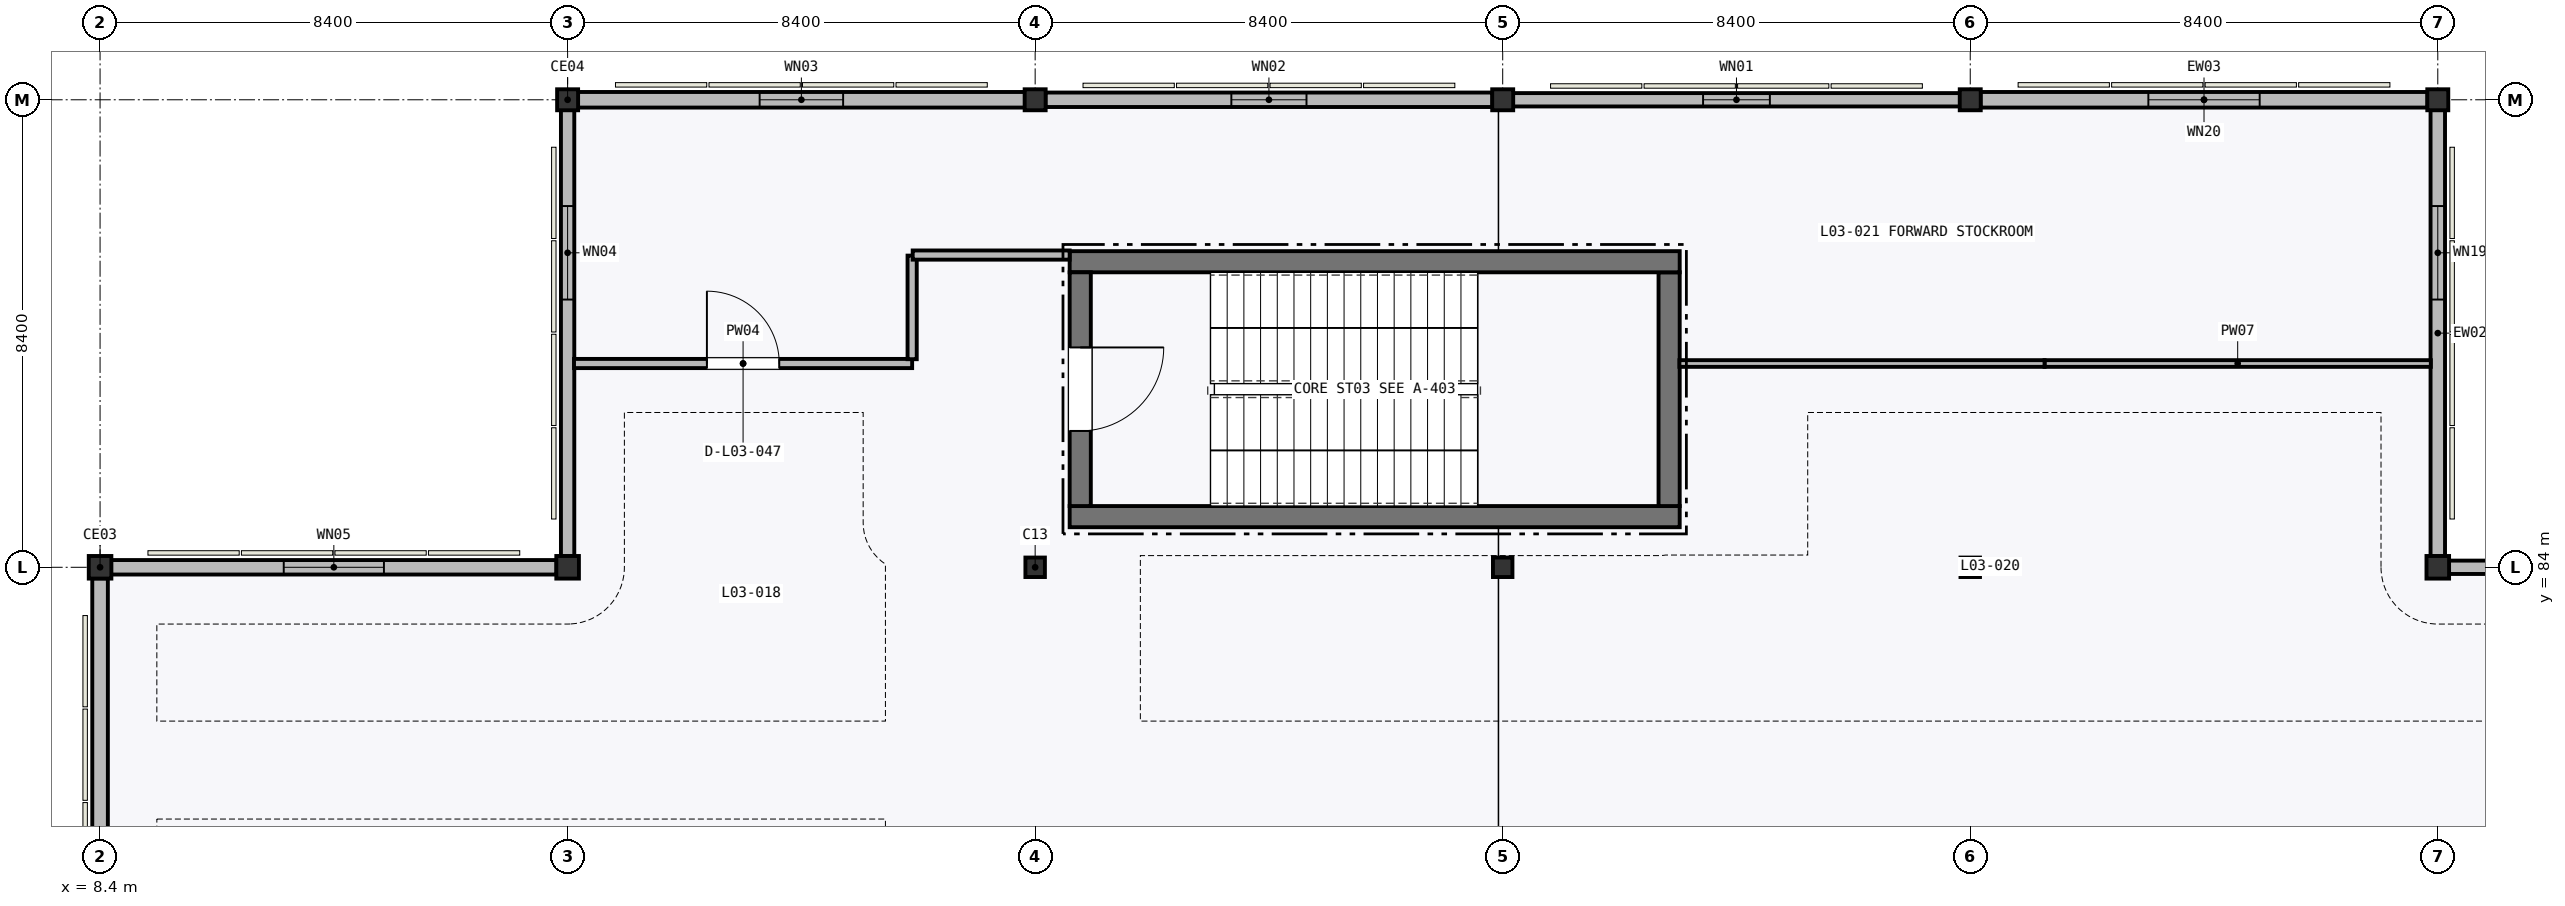
"""IFC4 building model, lengths in metres.
Left out: names, types, materials, properties, quantities, classifications, styles, units other than length and angle.
Written with IfcOpenShell. Run it as: python <this file> out.ifc"""

import sys

from ifc_helpers import new_model, si_unit, direction, frame, frame_2d, origin, origin_2d, place, context, subcontext, project, spatial, rectangle, hollow_circle, i_section, extrude, element, fill, save


model = new_model("IFC4")
c1 = context("Model", 3, precision=1e-05, world=origin(), true_north=direction((0.0, 1.0)))
c2 = subcontext(c1, "Body", "Model", "MODEL_VIEW")
j1 = project(units=[si_unit("LENGTHUNIT", "METRE"), si_unit("PLANEANGLEUNIT", "RADIAN")], contexts=[c1])
p1 = place(None, origin())
s1 = spatial("IfcSite", under=j1, at=p1, CompositionType="ELEMENT")
p2 = place(p1, origin())
s2 = spatial("IfcBuilding", under=s1, at=p2, CompositionType="ELEMENT")
p3 = place(p2, frame((0.0, 0.0, 11.4)))
s3 = spatial("IfcBuildingStorey", under=s2, at=p3, CompositionType="ELEMENT", Elevation=11.4)
for number, where, z_axis, x_axis in (
    (1, (8.4, 84.0, 0.0), (0.0, 0.0, 1.0), (1.0, 0.0, 0.0)),
    (2, (16.8, 84.0, 0.0), (0.0, 0.0, 1.0), (1.0, 0.0, 0.0)),
):
    element("IfcColumn", number, at=place(p3, frame(where, z_axis=z_axis, x_axis=x_axis)), inside=s3, PredefinedType="COLUMN", context=c2, shape_type="SweptSolid", body=[
        extrude(hollow_circle(Radius=0.203, WallThickness=0.016, at=origin_2d()), origin(), (0.0, 0.0, 1.0), 5.1),
    ])
p4 = place(p3, frame((16.8, 92.4, 0.0), z_axis=(0.0, 0.0, 1.0), x_axis=(1.0, 0.0, 0.0)))
e3 = element("IfcColumn", 3, at=p4, inside=s3, PredefinedType="COLUMN", context=c2, shape_type="SweptSolid", body=[
    extrude(hollow_circle(Radius=0.188, WallThickness=0.014, at=origin_2d()), origin(), (0.0, 0.0, 1.0), 5.1),
])
p5 = place(p3, frame((25.2, 84.0, 0.0), z_axis=(0.0, 0.0, 1.0), x_axis=(1.0, 0.0, 0.0)))
e4 = element("IfcColumn", 4, at=p5, inside=s3, PredefinedType="COLUMN", context=c2, shape_type="SweptSolid", body=[
    extrude(i_section(OverallWidth=0.35, OverallDepth=0.35, WebThickness=0.012, FlangeThickness=0.019, FilletRadius=0.02, at=origin_2d()), origin(), (0.0, 0.0, 1.0), 5.1),
])
p6 = place(p3, frame((25.2, 92.4, 0.0), z_axis=(0.0, 0.0, 1.0), x_axis=(1.0, 0.0, 0.0)))
e5 = element("IfcColumn", 5, at=p6, inside=s3, PredefinedType="COLUMN", context=c2, shape_type="SweptSolid", body=[
    extrude(hollow_circle(Radius=0.188, WallThickness=0.014, at=origin_2d()), origin(), (0.0, 0.0, 1.0), 5.1),
])
p7 = place(p3, frame((33.6, 84.0, 0.0), z_axis=(0.0, 0.0, 1.0), x_axis=(1.0, 0.0, 0.0)))
e6 = element("IfcColumn", 6, at=p7, inside=s3, PredefinedType="COLUMN", context=c2, shape_type="SweptSolid", body=[
    extrude(i_section(OverallWidth=0.35, OverallDepth=0.35, WebThickness=0.012, FlangeThickness=0.019, FilletRadius=0.02, at=origin_2d()), origin(), (0.0, 0.0, 1.0), 5.1),
])
p8 = place(p3, frame((33.6, 92.4, 0.0), z_axis=(0.0, 0.0, 1.0), x_axis=(1.0, 0.0, 0.0)))
e7 = element("IfcColumn", 7, at=p8, inside=s3, PredefinedType="COLUMN", context=c2, shape_type="SweptSolid", body=[
    extrude(hollow_circle(Radius=0.188, WallThickness=0.014, at=origin_2d()), origin(), (0.0, 0.0, 1.0), 5.1),
])
p9 = place(p3, frame((42.0, 84.0, 0.0), z_axis=(0.0, 0.0, 1.0), x_axis=(1.0, 0.0, 0.0)))
e8 = element("IfcColumn", 8, at=p9, inside=s3, PredefinedType="COLUMN", context=c2, shape_type="SweptSolid", body=[
    extrude(i_section(OverallWidth=0.35, OverallDepth=0.35, WebThickness=0.012, FlangeThickness=0.019, FilletRadius=0.02, at=origin_2d()), origin(), (0.0, 0.0, 1.0), 5.1),
])
p10 = place(p3, frame((42.0, 92.4, 0.0), z_axis=(0.0, 0.0, 1.0), x_axis=(1.0, 0.0, 0.0)))
e9 = element("IfcColumn", 9, at=p10, inside=s3, PredefinedType="COLUMN", context=c2, shape_type="SweptSolid", body=[
    extrude(hollow_circle(Radius=0.188, WallThickness=0.014, at=origin_2d()), origin(), (0.0, 0.0, 1.0), 5.1),
])
p11 = place(p3, frame((50.4, 84.0, 0.0), z_axis=(0.0, 0.0, 1.0), x_axis=(1.0, 0.0, 0.0)))
e10 = element("IfcColumn", 10, at=p11, inside=s3, PredefinedType="COLUMN", context=c2, shape_type="SweptSolid", body=[
    extrude(hollow_circle(Radius=0.203, WallThickness=0.016, at=origin_2d()), origin(), (0.0, 0.0, 1.0), 5.1),
])
p12 = place(p3, frame((50.4, 92.4, 0.0), z_axis=(0.0, 0.0, 1.0), x_axis=(1.0, 0.0, 0.0)))
e11 = element("IfcColumn", 11, at=p12, inside=s3, PredefinedType="COLUMN", context=c2, shape_type="SweptSolid", body=[
    extrude(hollow_circle(Radius=0.188, WallThickness=0.014, at=origin_2d()), origin(), (0.0, 0.0, 1.0), 5.1),
])
p13 = place(p3, frame((58.65, 84.0, 0.0), z_axis=(0.0, 0.0, 1.0), x_axis=(-1.0, 0.0, 0.0)))
e12 = element("IfcWall", 12, at=p13, inside=s3, PredefinedType="STANDARD", context=c2, shape_type="SweptSolid", body=[
    extrude(rectangle(XDim=8.052, YDim=0.24, at=frame_2d((4.026, 0.0))), origin(), (0.0, 0.0, 1.0), 4.331),
])
p14 = place(p13, frame((2.826, 0.0, 0.95)))
e13 = element("IfcOpeningElement", 13, at=p14, cuts=e12, PredefinedType="OPENING", context=c2, shape_type="SweptSolid", body=[
    extrude(rectangle(XDim=2.4, YDim=2.4, at=frame_2d((1.2, 1.2))), frame((0.0, 0.13, 0.0), z_axis=(0.0, -1.0, 0.0), x_axis=(1.0, 0.0, 0.0)), (0.0, 0.0, 1.0), 0.26),
])
p15 = place(p3, frame((50.4, 84.198, 0.0), z_axis=(0.0, 0.0, 1.0), x_axis=(0.0, 1.0, 0.0)))
e14 = element("IfcWall", 14, at=p15, inside=s3, PredefinedType="STANDARD", context=c2, shape_type="SweptSolid", body=[
    extrude(rectangle(XDim=8.019, YDim=0.26, at=frame_2d((4.009, 0.0))), origin(), (0.0, 0.0, 1.0), 4.487),
])
p16 = place(p15, frame((4.613, 0.0, 0.95)))
e15 = element("IfcOpeningElement", 15, at=p16, cuts=e14, PredefinedType="OPENING", context=c2, shape_type="SweptSolid", body=[
    extrude(rectangle(XDim=1.68, YDim=1.5, at=frame_2d((0.84, 0.75))), frame((0.0, 0.14, 0.0), z_axis=(0.0, -1.0, 0.0), x_axis=(1.0, 0.0, 0.0)), (0.0, 0.0, 1.0), 0.28),
])
p17 = place(p3, frame((50.217, 92.4, 0.0), z_axis=(0.0, 0.0, 1.0), x_axis=(-1.0, 0.0, 0.0)))
e16 = element("IfcWall", 16, at=p17, inside=s3, PredefinedType="STANDARD", context=c2, shape_type="SweptSolid", body=[
    extrude(rectangle(XDim=8.033, YDim=0.28, at=frame_2d((4.017, 0.0))), origin(), (0.0, 0.0, 1.0), 4.487),
])
p18 = place(p17, frame((3.017, 0.0, 0.95)))
e17 = element("IfcOpeningElement", 17, at=p18, cuts=e16, PredefinedType="OPENING", context=c2, shape_type="SweptSolid", body=[
    extrude(rectangle(XDim=2.0, YDim=1.6, at=frame_2d((1.0, 0.8))), frame((0.0, 0.15, 0.0), z_axis=(0.0, -1.0, 0.0), x_axis=(1.0, 0.0, 0.0)), (0.0, 0.0, 1.0), 0.3),
])
p19 = place(p3, frame((41.816, 92.4, 0.0), z_axis=(0.0, 0.0, 1.0), x_axis=(-1.0, 0.0, 0.0)))
e18 = element("IfcWall", 18, at=p19, inside=s3, PredefinedType="STANDARD", context=c2, shape_type="SweptSolid", body=[
    extrude(rectangle(XDim=8.033, YDim=0.24, at=frame_2d((4.017, 0.0))), origin(), (0.0, 0.0, 1.0), 4.487),
])
p20 = place(p19, frame((3.417, 0.0, 0.95)))
e19 = element("IfcOpeningElement", 19, at=p20, cuts=e18, PredefinedType="OPENING", context=c2, shape_type="SweptSolid", body=[
    extrude(rectangle(XDim=1.2, YDim=1.8, at=frame_2d((0.6, 0.9))), frame((0.0, 0.13, 0.0), z_axis=(0.0, -1.0, 0.0), x_axis=(1.0, 0.0, 0.0)), (0.0, 0.0, 1.0), 0.26),
])
p21 = place(p3, frame((33.417, 92.4, 0.0), z_axis=(0.0, 0.0, 1.0), x_axis=(-1.0, 0.0, 0.0)))
e20 = element("IfcWall", 20, at=p21, inside=s3, PredefinedType="STANDARD", context=c2, shape_type="SweptSolid", body=[
    extrude(rectangle(XDim=8.033, YDim=0.26, at=frame_2d((4.017, 0.0))), origin(), (0.0, 0.0, 1.0), 4.487),
])
p22 = place(p21, frame((3.342, 0.0, 0.95)))
e21 = element("IfcOpeningElement", 21, at=p22, cuts=e20, PredefinedType="OPENING", context=c2, shape_type="SweptSolid", body=[
    extrude(rectangle(XDim=1.35, YDim=1.8, at=frame_2d((0.675, 0.9))), frame((0.0, 0.14, 0.0), z_axis=(0.0, -1.0, 0.0), x_axis=(1.0, 0.0, 0.0)), (0.0, 0.0, 1.0), 0.28),
])
p23 = place(p3, frame((25.017, 92.4, 0.0), z_axis=(0.0, 0.0, 1.0), x_axis=(-1.0, 0.0, 0.0)))
e22 = element("IfcWall", 22, at=p23, inside=s3, PredefinedType="STANDARD", context=c2, shape_type="SweptSolid", body=[
    extrude(rectangle(XDim=8.033, YDim=0.28, at=frame_2d((4.017, 0.0))), origin(), (0.0, 0.0, 1.0), 4.487),
])
p24 = place(p23, frame((3.267, 0.0, 0.95)))
e23 = element("IfcOpeningElement", 23, at=p24, cuts=e22, PredefinedType="OPENING", context=c2, shape_type="SweptSolid", body=[
    extrude(rectangle(XDim=1.5, YDim=1.8, at=frame_2d((0.75, 0.9))), frame((0.0, 0.15, 0.0), z_axis=(0.0, -1.0, 0.0), x_axis=(1.0, 0.0, 0.0)), (0.0, 0.0, 1.0), 0.3),
])
p25 = place(p3, frame((16.8, 92.217, 0.0), z_axis=(0.0, 0.0, 1.0), x_axis=(0.0, -1.0, 0.0)))
e24 = element("IfcWall", 24, at=p25, inside=s3, PredefinedType="STANDARD", context=c2, shape_type="SweptSolid", body=[
    extrude(rectangle(XDim=8.019, YDim=0.24, at=frame_2d((4.009, 0.0))), origin(), (0.0, 0.0, 1.0), 4.487),
])
p26 = place(p25, frame((1.726, 0.0, 0.95)))
e25 = element("IfcOpeningElement", 25, at=p26, cuts=e24, PredefinedType="OPENING", context=c2, shape_type="SweptSolid", body=[
    extrude(rectangle(XDim=1.68, YDim=1.8, at=frame_2d((0.84, 0.9))), frame((0.0, 0.13, 0.0), z_axis=(0.0, -1.0, 0.0), x_axis=(1.0, 0.0, 0.0)), (0.0, 0.0, 1.0), 0.26),
])
p27 = place(p3, frame((16.602, 84.0, 0.0), z_axis=(0.0, 0.0, 1.0), x_axis=(-1.0, 0.0, 0.0)))
e26 = element("IfcWall", 26, at=p27, inside=s3, PredefinedType="STANDARD", context=c2, shape_type="SweptSolid", body=[
    extrude(rectangle(XDim=8.004, YDim=0.26, at=frame_2d((4.002, 0.0))), origin(), (0.0, 0.0, 1.0), 4.331),
])
p28 = place(p27, frame((3.102, 0.0, 0.95)))
e27 = element("IfcOpeningElement", 27, at=p28, cuts=e26, PredefinedType="OPENING", context=c2, shape_type="SweptSolid", body=[
    extrude(rectangle(XDim=1.8, YDim=1.8, at=frame_2d((0.9, 0.9))), frame((0.0, 0.14, 0.0), z_axis=(0.0, -1.0, 0.0), x_axis=(1.0, 0.0, 0.0)), (0.0, 0.0, 1.0), 0.28),
])
p29 = place(p3, frame((8.4, 83.802, 0.0), z_axis=(0.0, 0.0, 1.0), x_axis=(0.0, -1.0, 0.0)))
e28 = element("IfcWall", 28, at=p29, inside=s3, PredefinedType="STANDARD", context=c2, shape_type="SweptSolid", body=[
    extrude(rectangle(XDim=8.019, YDim=0.28, at=frame_2d((4.009, 0.0))), origin(), (0.0, 0.0, 1.0), 4.487),
])
p30 = place(p29, frame((4.853, 0.0, 0.95)))
e29 = element("IfcOpeningElement", 29, at=p30, cuts=e28, PredefinedType="OPENING", context=c2, shape_type="SweptSolid", body=[
    extrude(rectangle(XDim=1.2, YDim=2.1, at=frame_2d((0.6, 1.05))), frame((0.0, 0.15, 0.0), z_axis=(0.0, -1.0, 0.0), x_axis=(1.0, 0.0, 0.0)), (0.0, 0.0, 1.0), 0.3),
])
p31 = place(p3, frame((25.82, 84.91, 0.0), z_axis=(0.0, 0.0, 1.0), x_axis=(1.0, 0.0, 0.0)))
e30 = element("IfcWall", 30, at=p31, inside=s3, PredefinedType="SHEAR", context=c2, shape_type="SweptSolid", body=[
    extrude(rectangle(XDim=10.96, YDim=0.38, at=frame_2d((5.48, 0.0))), origin(), (0.0, 0.0, 1.0), 4.845),
])
p32 = place(p3, frame((36.59, 85.1, 0.0), z_axis=(0.0, 0.0, 1.0), x_axis=(0.0, 1.0, 0.0)))
e31 = element("IfcWall", 31, at=p32, inside=s3, PredefinedType="SHEAR", context=c2, shape_type="SweptSolid", body=[
    extrude(rectangle(XDim=4.2, YDim=0.38, at=frame_2d((2.1, 0.0))), origin(), (0.0, 0.0, 1.0), 4.845),
])
p33 = place(p3, frame((36.78, 89.49, 0.0), z_axis=(0.0, 0.0, 1.0), x_axis=(-1.0, 0.0, 0.0)))
e32 = element("IfcWall", 32, at=p33, inside=s3, PredefinedType="SHEAR", context=c2, shape_type="SweptSolid", body=[
    extrude(rectangle(XDim=10.96, YDim=0.38, at=frame_2d((5.48, 0.0))), origin(), (0.0, 0.0, 1.0), 4.845),
])
p34 = place(p3, frame((26.01, 89.3, 0.0), z_axis=(0.0, 0.0, 1.0), x_axis=(0.0, -1.0, 0.0)))
e33 = element("IfcWall", 33, at=p34, inside=s3, PredefinedType="SHEAR", context=c2, shape_type="SweptSolid", body=[
    extrude(rectangle(XDim=4.2, YDim=0.38, at=frame_2d((2.1, 0.0))), origin(), (0.0, 0.0, 1.0), 4.845),
])
p35 = place(p34, frame((1.35, 0.0, 0.0)))
e34 = element("IfcOpeningElement", 34, at=p35, cuts=e33, PredefinedType="OPENING", context=c2, shape_type="SweptSolid", body=[
    extrude(rectangle(XDim=1.5, YDim=2.15, at=frame_2d((0.75, 1.075))), frame((0.0, 0.2, 0.0), z_axis=(0.0, -1.0, 0.0), x_axis=(1.0, 0.0, 0.0)), (0.0, 0.0, 1.0), 0.4),
])
p36 = place(p3, frame((50.275, 87.661, 0.0), z_axis=(0.0, 0.0, 1.0), x_axis=(-1.0, 0.0, 0.0)))
e35 = element("IfcWall", 35, at=p36, inside=s3, PredefinedType="PARTITIONING", context=c2, shape_type="SweptSolid", body=[
    extrude(rectangle(XDim=6.94, YDim=0.12, at=frame_2d((3.47, 0.0))), origin(), (0.0, 0.0, 1.0), 4.845),
])
p37 = place(p3, frame((43.335, 87.661, 0.0), z_axis=(0.0, 0.0, 1.0), x_axis=(-1.0, 0.0, 0.0)))
e36 = element("IfcWall", 36, at=p37, inside=s3, PredefinedType="PARTITIONING", context=c2, shape_type="SweptSolid", body=[
    extrude(rectangle(XDim=6.56, YDim=0.12, at=frame_2d((3.28, 0.0))), origin(), (0.0, 0.0, 1.0), 4.845),
])
p38 = place(p3, frame((16.915, 87.661, 0.0), z_axis=(0.0, 0.0, 1.0), x_axis=(1.0, 0.0, 0.0)))
e37 = element("IfcWall", 37, at=p38, inside=s3, PredefinedType="PARTITIONING", context=c2, shape_type="SweptSolid", body=[
    extrude(rectangle(XDim=6.075, YDim=0.165, at=frame_2d((3.038, 0.0))), origin(), (0.0, 0.0, 1.0), 4.845),
])
p39 = place(p38, frame((2.387, 0.0, 0.0)))
e38 = element("IfcOpeningElement", 38, at=p39, cuts=e37, PredefinedType="OPENING", context=c2, shape_type="SweptSolid", body=[
    extrude(rectangle(XDim=1.3, YDim=2.2, at=frame_2d((0.65, 1.1))), frame((0.0, 0.093, 0.0), z_axis=(0.0, -1.0, 0.0), x_axis=(1.0, 0.0, 0.0)), (0.0, 0.0, 1.0), 0.185),
])
p40 = place(p3, frame((22.99, 87.739, 0.0), z_axis=(0.0, 0.0, 1.0), x_axis=(0.0, 1.0, 0.0)))
e39 = element("IfcWall", 39, at=p40, inside=s3, PredefinedType="PARTITIONING", context=c2, shape_type="SweptSolid", body=[
    extrude(rectangle(XDim=1.861, YDim=0.165, at=frame_2d((0.931, 0.0))), origin(), (0.0, 0.0, 1.0), 4.845),
])
p41 = place(p3, frame((23.0, 89.61, 0.0), z_axis=(0.0, 0.0, 1.0), x_axis=(1.0, 0.0, 0.0)))
e40 = element("IfcWall", 40, at=p41, inside=s3, PredefinedType="PARTITIONING", context=c2, shape_type="SweptSolid", body=[
    extrude(rectangle(XDim=2.82, YDim=0.165, at=frame_2d((1.41, 0.0))), origin(), (0.0, 0.0, 1.0), 4.845),
])
p42 = place(p16, origin())
e41 = element("IfcWindow", 41, at=p42, inside=s3, PartitioningType="SINGLE_PANEL", PredefinedType="WINDOW", context=c2, shape_type="SweptSolid", body=[
    extrude(rectangle(XDim=1.68, YDim=1.5, at=frame_2d((0.84, 0.75))), frame((0.0, 0.03, 0.0), z_axis=(0.0, -1.0, 0.0), x_axis=(1.0, 0.0, 0.0)), (0.0, 0.0, 1.0), 0.06),
])
fill(e15, e41)
p43 = place(p18, origin())
e42 = element("IfcWindow", 42, at=p43, inside=s3, PartitioningType="SINGLE_PANEL", PredefinedType="WINDOW", context=c2, shape_type="SweptSolid", body=[
    extrude(rectangle(XDim=2.0, YDim=1.6, at=frame_2d((1.0, 0.8))), frame((0.0, 0.03, 0.0), z_axis=(0.0, -1.0, 0.0), x_axis=(1.0, 0.0, 0.0)), (0.0, 0.0, 1.0), 0.06),
])
fill(e17, e42)
p44 = place(p20, origin())
e43 = element("IfcWindow", 43, at=p44, inside=s3, PartitioningType="SINGLE_PANEL", PredefinedType="WINDOW", context=c2, shape_type="SweptSolid", body=[
    extrude(rectangle(XDim=1.2, YDim=1.8, at=frame_2d((0.6, 0.9))), frame((0.0, 0.03, 0.0), z_axis=(0.0, -1.0, 0.0), x_axis=(1.0, 0.0, 0.0)), (0.0, 0.0, 1.0), 0.06),
])
fill(e19, e43)
p45 = place(p22, origin())
e44 = element("IfcWindow", 44, at=p45, inside=s3, PartitioningType="SINGLE_PANEL", PredefinedType="WINDOW", context=c2, shape_type="SweptSolid", body=[
    extrude(rectangle(XDim=1.35, YDim=1.8, at=frame_2d((0.675, 0.9))), frame((0.0, 0.03, 0.0), z_axis=(0.0, -1.0, 0.0), x_axis=(1.0, 0.0, 0.0)), (0.0, 0.0, 1.0), 0.06),
])
fill(e21, e44)
p46 = place(p24, origin())
e45 = element("IfcWindow", 45, at=p46, inside=s3, PartitioningType="SINGLE_PANEL", PredefinedType="WINDOW", context=c2, shape_type="SweptSolid", body=[
    extrude(rectangle(XDim=1.5, YDim=1.8, at=frame_2d((0.75, 0.9))), frame((0.0, 0.03, 0.0), z_axis=(0.0, -1.0, 0.0), x_axis=(1.0, 0.0, 0.0)), (0.0, 0.0, 1.0), 0.06),
])
fill(e23, e45)
p47 = place(p26, origin())
e46 = element("IfcWindow", 46, at=p47, inside=s3, PartitioningType="SINGLE_PANEL", PredefinedType="WINDOW", context=c2, shape_type="SweptSolid", body=[
    extrude(rectangle(XDim=1.68, YDim=1.8, at=frame_2d((0.84, 0.9))), frame((0.0, 0.03, 0.0), z_axis=(0.0, -1.0, 0.0), x_axis=(1.0, 0.0, 0.0)), (0.0, 0.0, 1.0), 0.06),
])
fill(e25, e46)
p48 = place(p28, origin())
e47 = element("IfcWindow", 47, at=p48, inside=s3, PartitioningType="SINGLE_PANEL", PredefinedType="WINDOW", context=c2, shape_type="SweptSolid", body=[
    extrude(rectangle(XDim=1.8, YDim=1.8, at=frame_2d((0.9, 0.9))), frame((0.0, 0.03, 0.0), z_axis=(0.0, -1.0, 0.0), x_axis=(1.0, 0.0, 0.0)), (0.0, 0.0, 1.0), 0.06),
])
fill(e27, e47)
p49 = place(p35, origin())
e48 = element("IfcDoor", 48, at=p49, inside=s3, OperationType="SINGLE_SWING_LEFT", PredefinedType="DOOR", context=c2, shape_type="SweptSolid", body=[
    extrude(rectangle(XDim=1.5, YDim=2.15, at=frame_2d((0.75, 1.075))), frame((0.0, 0.025, 0.0), z_axis=(0.0, -1.0, 0.0), x_axis=(1.0, 0.0, 0.0)), (0.0, 0.0, 1.0), 0.05),
])
fill(e34, e48)
p50 = place(p39, origin())
e49 = element("IfcDoor", 49, at=p50, inside=s3, OperationType="SINGLE_SWING_LEFT", PredefinedType="DOOR", context=c2, shape_type="SweptSolid", body=[
    extrude(rectangle(XDim=1.3, YDim=2.2, at=frame_2d((0.65, 1.1))), frame((0.0, 0.025, 0.0), z_axis=(0.0, -1.0, 0.0), x_axis=(1.0, 0.0, 0.0)), (0.0, 0.0, 1.0), 0.05),
])
fill(e38, e49)
save(model, sys.argv[1])
